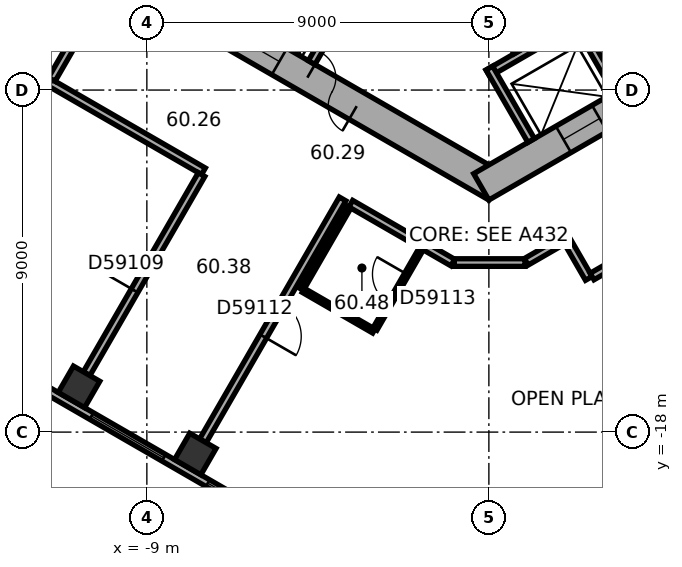
"""IFC4 building model, lengths in metres.
Left out: names, types, materials, properties, quantities, classifications, styles, units other than length and angle.
Written with IfcOpenShell. Run it as: python <this file> out.ifc"""

import sys

from ifc_helpers import new_model, si_unit, direction, frame, frame_2d, origin, origin_2d, place, context, subcontext, project, spatial, rectangle, extrude, element, fill, save


model = new_model("IFC4")
c1 = context("Model", 3, precision=1e-05, world=origin(), true_north=direction((0.0, 1.0)))
c2 = subcontext(c1, "Body", "Model", "MODEL_VIEW")
j1 = project(units=[si_unit("LENGTHUNIT", "METRE"), si_unit("PLANEANGLEUNIT", "RADIAN")], contexts=[c1])
p1 = place(None, origin())
s1 = spatial("IfcSite", under=j1, at=p1, CompositionType="ELEMENT")
p2 = place(p1, origin())
s2 = spatial("IfcBuilding", under=s1, at=p2, CompositionType="ELEMENT")
p3 = place(p2, frame((0.0, 0.0, 243.9)))
s3 = spatial("IfcBuildingStorey", under=s2, at=p3, CompositionType="ELEMENT", Elevation=243.9)
for number, where, z_axis, x_axis in (
    (1, (-10.785, -16.809, 0.0), (0.0, 0.0, 1.0), (0.866, -0.5, 0.0)),
    (2, (-7.725, -18.576, 0.0), (0.0, 0.0, 1.0), (0.866, -0.5, 0.0)),
):
    element("IfcColumn", number, at=place(p3, frame(where, z_axis=z_axis, x_axis=x_axis)), inside=s3, PredefinedType="COLUMN", context=c2, shape_type="SweptSolid", body=[
        extrude(rectangle(XDim=0.8, YDim=0.8, at=origin_2d()), origin(), (0.0, 0.0, 1.0), 3.7),
    ])
p4 = place(p3, frame((-10.1, -5.6, 0.0), z_axis=(0.0, 0.0, 1.0), x_axis=(0.866023897231, -0.500002609418, 0.0)))
e3 = element("IfcWall", 3, at=p4, inside=s3, PredefinedType="SHEAR", context=c2, shape_type="SweptSolid", body=[
    extrude(rectangle(XDim=11.894, YDim=0.8, at=frame_2d((5.947, 0.0))), origin(), (0.0, 0.0, 1.0), 3.7),
])
p5 = place(p4, frame((6.147, 0.0, 0.0)))
e4 = element("IfcOpeningElement", 4, at=p5, cuts=e3, PredefinedType="OPENING", context=c2, shape_type="SweptSolid", body=[
    extrude(rectangle(XDim=1.5, YDim=2.1, at=frame_2d((0.75, 1.05))), frame((0.0, 0.41, 0.0), z_axis=(0.0, -1.0, 0.0), x_axis=(1.0, 0.0, 0.0)), (0.0, 0.0, 1.0), 0.82),
])
p6 = place(p4, frame((1.597, 0.0, 0.0)))
e5 = element("IfcOpeningElement", 5, at=p6, cuts=e3, PredefinedType="OPENING", context=c2, shape_type="SweptSolid", body=[
    extrude(rectangle(XDim=1.1, YDim=2.1, at=frame_2d((0.55, 1.05))), frame((0.0, 0.41, 0.0), z_axis=(0.0, -1.0, 0.0), x_axis=(1.0, 0.0, 0.0)), (0.0, 0.0, 1.0), 0.82),
])
p7 = place(p4, frame((4.197, 0.0, 0.0)))
e6 = element("IfcOpeningElement", 6, at=p7, cuts=e3, PredefinedType="OPENING", context=c2, shape_type="SweptSolid", body=[
    extrude(rectangle(XDim=1.1, YDim=2.1, at=frame_2d((0.55, 1.05))), frame((0.0, 0.41, 0.0), z_axis=(0.0, -1.0, 0.0), x_axis=(1.0, 0.0, 0.0)), (0.0, 0.0, 1.0), 0.82),
])
p8 = place(p3, frame((-0.2, -11.547, 0.0), z_axis=(0.0, 0.0, 1.0), x_axis=(0.866023897231, 0.500002609418, 0.0)))
e7 = element("IfcWall", 7, at=p8, inside=s3, PredefinedType="SHEAR", context=c2, shape_type="SweptSolid", body=[
    extrude(rectangle(XDim=11.894, YDim=0.8, at=frame_2d((5.947, 0.0))), origin(), (0.0, 0.0, 1.0), 3.7),
])
p9 = place(p8, frame((2.497, 0.0, 0.0)))
e8 = element("IfcOpeningElement", 8, at=p9, cuts=e7, PredefinedType="OPENING", context=c2, shape_type="SweptSolid", body=[
    extrude(rectangle(XDim=1.1, YDim=2.1, at=frame_2d((0.55, 1.05))), frame((0.0, 0.41, 0.0), z_axis=(0.0, -1.0, 0.0), x_axis=(1.0, 0.0, 0.0)), (0.0, 0.0, 1.0), 0.82),
])
p10 = place(p8, frame((5.097, 0.0, 0.0)))
e9 = element("IfcOpeningElement", 9, at=p10, cuts=e7, PredefinedType="OPENING", context=c2, shape_type="SweptSolid", body=[
    extrude(rectangle(XDim=1.1, YDim=2.1, at=frame_2d((0.55, 1.05))), frame((0.0, 0.41, 0.0), z_axis=(0.0, -1.0, 0.0), x_axis=(1.0, 0.0, 0.0)), (0.0, 0.0, 1.0), 0.82),
])
p11 = place(p8, frame((7.697, 0.0, 0.0)))
e10 = element("IfcOpeningElement", 10, at=p11, cuts=e7, PredefinedType="OPENING", context=c2, shape_type="SweptSolid", body=[
    extrude(rectangle(XDim=1.1, YDim=2.1, at=frame_2d((0.55, 1.05))), frame((0.0, 0.41, 0.0), z_axis=(0.0, -1.0, 0.0), x_axis=(1.0, 0.0, 0.0)), (0.0, 0.0, 1.0), 0.82),
])
p12 = place(p3, frame((-17.664, -13.415, 0.0), z_axis=(0.0, 0.0, 1.0), x_axis=(0.866026555358, -0.49999800541, 0.0)))
e11 = element("IfcWall", 11, at=p12, inside=s3, PredefinedType="STANDARD", context=c2, shape_type="SweptSolid", body=[
    extrude(rectangle(XDim=18.841, YDim=0.2, at=frame_2d((9.421, 0.0))), origin(), (0.0, 0.0, 1.0), 3.7),
])
p13 = place(p12, frame((1.254, 0.0, 0.9)))
e12 = element("IfcOpeningElement", 12, at=p13, cuts=e11, PredefinedType="OPENING", context=c2, shape_type="SweptSolid", body=[
    extrude(rectangle(XDim=2.2, YDim=2.0, at=frame_2d((1.1, 1.0))), frame((0.0, 0.11, 0.0), z_axis=(0.0, -1.0, 0.0), x_axis=(1.0, 0.0, 0.0)), (0.0, 0.0, 1.0), 0.22),
])
p14 = place(p12, frame((4.788, 0.0, 0.9)))
e13 = element("IfcOpeningElement", 13, at=p14, cuts=e11, PredefinedType="OPENING", context=c2, shape_type="SweptSolid", body=[
    extrude(rectangle(XDim=2.2, YDim=2.0, at=frame_2d((1.1, 1.0))), frame((0.0, 0.11, 0.0), z_axis=(0.0, -1.0, 0.0), x_axis=(1.0, 0.0, 0.0)), (0.0, 0.0, 1.0), 0.22),
])
p15 = place(p12, frame((8.322, 0.0, 0.9)))
e14 = element("IfcOpeningElement", 14, at=p15, cuts=e11, PredefinedType="OPENING", context=c2, shape_type="SweptSolid", body=[
    extrude(rectangle(XDim=2.2, YDim=2.0, at=frame_2d((1.1, 1.0))), frame((0.0, 0.11, 0.0), z_axis=(0.0, -1.0, 0.0), x_axis=(1.0, 0.0, 0.0)), (0.0, 0.0, 1.0), 0.22),
])
p16 = place(p12, frame((11.855, 0.0, 0.9)))
e15 = element("IfcOpeningElement", 15, at=p16, cuts=e11, PredefinedType="OPENING", context=c2, shape_type="SweptSolid", body=[
    extrude(rectangle(XDim=2.2, YDim=2.0, at=frame_2d((1.1, 1.0))), frame((0.0, 0.11, 0.0), z_axis=(0.0, -1.0, 0.0), x_axis=(1.0, 0.0, 0.0)), (0.0, 0.0, 1.0), 0.22),
])
p17 = place(p12, frame((15.389, 0.0, 0.9)))
e16 = element("IfcOpeningElement", 16, at=p17, cuts=e11, PredefinedType="OPENING", context=c2, shape_type="SweptSolid", body=[
    extrude(rectangle(XDim=2.2, YDim=2.0, at=frame_2d((1.1, 1.0))), frame((0.0, 0.11, 0.0), z_axis=(0.0, -1.0, 0.0), x_axis=(1.0, 0.0, 0.0)), (0.0, 0.0, 1.0), 0.22),
])
p18 = place(p3, frame((2.739, -22.711, 0.0), z_axis=(0.0, 0.0, 1.0), x_axis=(0.833885723098, 0.551937134838, 0.0)))
e17 = element("IfcWall", 17, at=p18, inside=s3, PredefinedType="STANDARD", context=c2, shape_type="SweptSolid", body=[
    extrude(rectangle(XDim=18.841, YDim=0.2, at=frame_2d((9.421, 0.0))), origin(), (0.0, 0.0, 1.0), 3.7),
])
p19 = place(p18, frame((1.252, 0.0, 0.9)))
e18 = element("IfcOpeningElement", 18, at=p19, cuts=e17, PredefinedType="OPENING", context=c2, shape_type="SweptSolid", body=[
    extrude(rectangle(XDim=2.2, YDim=2.0, at=frame_2d((1.1, 1.0))), frame((0.0, 0.11, 0.0), z_axis=(0.0, -1.0, 0.0), x_axis=(1.0, 0.0, 0.0)), (0.0, 0.0, 1.0), 0.22),
])
p20 = place(p18, frame((4.786, 0.0, 0.9)))
e19 = element("IfcOpeningElement", 19, at=p20, cuts=e17, PredefinedType="OPENING", context=c2, shape_type="SweptSolid", body=[
    extrude(rectangle(XDim=2.2, YDim=2.0, at=frame_2d((1.1, 1.0))), frame((0.0, 0.11, 0.0), z_axis=(0.0, -1.0, 0.0), x_axis=(1.0, 0.0, 0.0)), (0.0, 0.0, 1.0), 0.22),
])
p21 = place(p18, frame((8.32, 0.0, 0.9)))
e20 = element("IfcOpeningElement", 20, at=p21, cuts=e17, PredefinedType="OPENING", context=c2, shape_type="SweptSolid", body=[
    extrude(rectangle(XDim=2.2, YDim=2.0, at=frame_2d((1.1, 1.0))), frame((0.0, 0.11, 0.0), z_axis=(0.0, -1.0, 0.0), x_axis=(1.0, 0.0, 0.0)), (0.0, 0.0, 1.0), 0.22),
])
p22 = place(p18, frame((11.854, 0.0, 0.9)))
e21 = element("IfcOpeningElement", 21, at=p22, cuts=e17, PredefinedType="OPENING", context=c2, shape_type="SweptSolid", body=[
    extrude(rectangle(XDim=2.2, YDim=2.0, at=frame_2d((1.1, 1.0))), frame((0.0, 0.11, 0.0), z_axis=(0.0, -1.0, 0.0), x_axis=(1.0, 0.0, 0.0)), (0.0, 0.0, 1.0), 0.22),
])
p23 = place(p18, frame((15.387, 0.0, 0.9)))
e22 = element("IfcOpeningElement", 22, at=p23, cuts=e17, PredefinedType="OPENING", context=c2, shape_type="SweptSolid", body=[
    extrude(rectangle(XDim=2.2, YDim=2.0, at=frame_2d((1.1, 1.0))), frame((0.0, 0.11, 0.0), z_axis=(0.0, -1.0, 0.0), x_axis=(1.0, 0.0, 0.0)), (0.0, 0.0, 1.0), 0.22),
])
p24 = place(p3, frame((-3.563, -6.372, 0.0), z_axis=(0.0, 0.0, 1.0), x_axis=(-0.499994660107, -0.866028486751, 0.0)))
e23 = element("IfcWall", 23, at=p24, inside=s3, PredefinedType="PARTITIONING", context=c2, shape_type="SweptSolid", body=[
    extrude(rectangle(XDim=2.2, YDim=0.2, at=frame_2d((1.1, 0.0))), origin(), (0.0, 0.0, 1.0), 3.42),
])
p25 = place(p3, frame((-0.024, -8.559, 0.0), z_axis=(0.0, 0.0, 1.0), x_axis=(0.866026010844, 0.49999894854, 0.0)))
e24 = element("IfcWall", 24, at=p25, inside=s3, PredefinedType="PARTITIONING", context=c2, shape_type="SweptSolid", body=[
    extrude(rectangle(XDim=8.0, YDim=0.2, at=frame_2d((4.0, 0.0))), origin(), (0.0, 0.0, 1.0), 3.42),
])
for number, where, z_axis, x_axis in (
    (25, (0.013, -8.422, 0.0), (0.0, 0.0, 1.0), (0.5, -0.866, 0.0)),
    (26, (2.264, -7.122, 0.0), (0.0, 0.0, 1.0), (0.5, -0.866, 0.0)),
):
    element("IfcWall", number, at=place(p3, frame(where, z_axis=z_axis, x_axis=x_axis)), inside=s3, PredefinedType="PARTITIONING", context=c2, shape_type="SweptSolid", body=[
        extrude(rectangle(XDim=2.2, YDim=0.2, at=frame_2d((1.1, 0.0))), origin(), (0.0, 0.0, 1.0), 3.42),
    ])
p26 = place(p3, frame((-1.558, -3.902, 0.0), z_axis=(0.0, 0.0, 1.0), x_axis=(0.499977259774, -0.866038532462, 0.0)))
e27 = element("IfcWall", 27, at=p26, inside=s3, PredefinedType="SHEAR", context=c2, shape_type="SweptSolid", body=[
    extrude(rectangle(XDim=4.7, YDim=0.3, at=frame_2d((2.35, 0.0))), origin(), (0.0, 0.0, 1.0), 3.42),
])
p27 = place(p26, frame((0.8, 0.0, 0.0)))
e28 = element("IfcOpeningElement", 28, at=p27, cuts=e27, PredefinedType="OPENING", context=c2, shape_type="SweptSolid", body=[
    extrude(rectangle(XDim=1.2, YDim=2.1, at=frame_2d((0.6, 1.05))), frame((0.0, 0.16, 0.0), z_axis=(0.0, -1.0, 0.0), x_axis=(1.0, 0.0, 0.0)), (0.0, 0.0, 1.0), 0.32),
])
p28 = place(p3, frame((-11.551, -8.805, 0.0), z_axis=(0.0, 0.0, 1.0), x_axis=(0.866038310922, -0.499977643516, 0.0)))
e29 = element("IfcWall", 29, at=p28, inside=s3, PredefinedType="PARTITIONING", context=c2, shape_type="SweptSolid", body=[
    extrude(rectangle(XDim=4.665, YDim=0.2, at=frame_2d((2.333, 0.0))), origin(), (0.0, 0.0, 1.0), 3.42),
])
p29 = place(p3, frame((-10.951, -7.765, 0.0), z_axis=(0.0, 0.0, 1.0), x_axis=(-0.499978356969, -0.866037899034, 0.0)))
e30 = element("IfcWall", 30, at=p29, inside=s3, PredefinedType="PARTITIONING", context=c2, shape_type="SweptSolid", body=[
    extrude(rectangle(XDim=1.101, YDim=0.2, at=frame_2d((0.551, 0.0))), origin(), (0.0, 0.0, 1.0), 3.42),
])
p30 = place(p3, frame((-10.585, -16.463, 0.0), z_axis=(0.0, 0.0, 1.0), x_axis=(0.499993802756, 0.866028981735, 0.0)))
e31 = element("IfcWall", 31, at=p30, inside=s3, PredefinedType="PARTITIONING", context=c2, shape_type="SweptSolid", body=[
    extrude(rectangle(XDim=6.049, YDim=0.2, at=frame_2d((3.024, 0.0))), origin(), (0.0, 0.0, 1.0), 2.87),
])
p31 = place(p30, frame((2.524, 0.0, 0.0)))
e32 = element("IfcOpeningElement", 32, at=p31, cuts=e31, PredefinedType="OPENING", context=c2, shape_type="SweptSolid", body=[
    extrude(rectangle(XDim=1.0, YDim=2.1, at=frame_2d((0.5, 1.05))), frame((0.0, 0.11, 0.0), z_axis=(0.0, -1.0, 0.0), x_axis=(1.0, 0.0, 0.0)), (0.0, 0.0, 1.0), 0.22),
])
p32 = place(p3, frame((-7.525, -18.23, 0.0), z_axis=(0.0, 0.0, 1.0), x_axis=(0.499983153418, 0.866035129944, 0.0)))
e33 = element("IfcWall", 33, at=p32, inside=s3, PredefinedType="PARTITIONING", context=c2, shape_type="SweptSolid", body=[
    extrude(rectangle(XDim=7.35, YDim=0.2, at=frame_2d((3.675, 0.0))), origin(), (0.0, 0.0, 1.0), 3.42),
])
p33 = place(p32, frame((3.175, 0.0, 0.0)))
e34 = element("IfcOpeningElement", 34, at=p33, cuts=e33, PredefinedType="OPENING", context=c2, shape_type="SweptSolid", body=[
    extrude(rectangle(XDim=1.0, YDim=2.1, at=frame_2d((0.5, 1.05))), frame((0.0, 0.11, 0.0), z_axis=(0.0, -1.0, 0.0), x_axis=(1.0, 0.0, 0.0)), (0.0, 0.0, 1.0), 0.22),
])
p34 = place(p3, frame((-4.934, -14.241, 0.0), z_axis=(0.0, 0.0, 1.0), x_axis=(0.500004234368, 0.866022959057, 0.0)))
e35 = element("IfcWall", 35, at=p34, inside=s3, PredefinedType="PARTITIONING", context=c2, shape_type="SweptSolid", body=[
    extrude(rectangle(XDim=2.5, YDim=0.12, at=frame_2d((1.25, 0.0))), origin(), (0.0, 0.0, 1.0), 3.42),
])
p35 = place(p3, frame((-3.634, -11.99, 0.0), z_axis=(0.0, 0.0, 1.0), x_axis=(0.866033392248, -0.499986163319, 0.0)))
e36 = element("IfcWall", 36, at=p35, inside=s3, PredefinedType="PARTITIONING", context=c2, shape_type="SweptSolid", body=[
    extrude(rectangle(XDim=3.099, YDim=0.2, at=frame_2d((1.549, 0.0))), origin(), (0.0, 0.0, 1.0), 3.42),
])
p36 = place(p3, frame((-3.028, -15.341, 0.0), z_axis=(0.0, 0.0, 1.0), x_axis=(-0.86600889856, 0.500028586798, 0.0)))
e37 = element("IfcWall", 37, at=p36, inside=s3, PredefinedType="PARTITIONING", context=c2, shape_type="SweptSolid", body=[
    extrude(rectangle(XDim=2.14, YDim=0.12, at=frame_2d((1.07, 0.0))), origin(), (0.0, 0.0, 1.0), 3.42),
])
p37 = place(p3, frame((-1.778, -13.176, 0.0), z_axis=(0.0, 0.0, 1.0), x_axis=(-0.500002508028, -0.866023955769, 0.0)))
e38 = element("IfcWall", 38, at=p37, inside=s3, PredefinedType="PARTITIONING", context=c2, shape_type="SweptSolid", body=[
    extrude(rectangle(XDim=2.44, YDim=0.12, at=frame_2d((1.22, 0.0))), origin(), (0.0, 0.0, 1.0), 3.42),
])
p38 = place(p37, frame((0.77, 0.0, 0.0)))
e39 = element("IfcOpeningElement", 39, at=p38, cuts=e38, PredefinedType="OPENING", context=c2, shape_type="SweptSolid", body=[
    extrude(rectangle(XDim=0.9, YDim=2.1, at=frame_2d((0.45, 1.05))), frame((0.0, 0.07, 0.0), z_axis=(0.0, -1.0, 0.0), x_axis=(1.0, 0.0, 0.0)), (0.0, 0.0, 1.0), 0.14),
])
p39 = place(p3, frame((-0.91, -13.539, 0.0), z_axis=(0.0, 0.0, 1.0), x_axis=(1.0, 0.0, 0.0)))
e40 = element("IfcWall", 40, at=p39, inside=s3, PredefinedType="PARTITIONING", context=c2, shape_type="SweptSolid", body=[
    extrude(rectangle(XDim=1.86, YDim=0.2, at=frame_2d((0.93, 0.0))), origin(), (0.0, 0.0, 1.0), 3.42),
])
p40 = place(p3, frame((0.985, -13.519, 0.0), z_axis=(0.0, 0.0, 1.0), x_axis=(0.866054082991, 0.499950322867, 0.0)))
e41 = element("IfcWall", 41, at=p40, inside=s3, PredefinedType="PARTITIONING", context=c2, shape_type="SweptSolid", body=[
    extrude(rectangle(XDim=1.206, YDim=0.2, at=frame_2d((0.603, 0.0))), origin(), (0.0, 0.0, 1.0), 3.42),
])
p41 = place(p3, frame((2.079, -13.003, 0.0), z_axis=(0.0, 0.0, 1.0), x_axis=(0.500074377092, -0.865982457891, 0.0)))
e42 = element("IfcWall", 42, at=p41, inside=s3, PredefinedType="PARTITIONING", context=c2, shape_type="SweptSolid", body=[
    extrude(rectangle(XDim=1.101, YDim=0.2, at=frame_2d((0.55, 0.0))), origin(), (0.0, 0.0, 1.0), 3.42),
])
p42 = place(p3, frame((2.716, -13.906, 0.0), z_axis=(0.0, 0.0, 1.0), x_axis=(0.866040290674, 0.499974214264, 0.0)))
e43 = element("IfcWall", 43, at=p42, inside=s3, PredefinedType="PARTITIONING", context=c2, shape_type="SweptSolid", body=[
    extrude(rectangle(XDim=8.702, YDim=0.2, at=frame_2d((4.351, 0.0))), origin(), (0.0, 0.0, 1.0), 3.42),
])
p43 = place(p42, frame((5.26, 0.0, 0.0)))
e44 = element("IfcOpeningElement", 44, at=p43, cuts=e43, PredefinedType="OPENING", context=c2, shape_type="SweptSolid", body=[
    extrude(rectangle(XDim=1.0, YDim=2.1, at=frame_2d((0.5, 1.05))), frame((0.0, 0.11, 0.0), z_axis=(0.0, -1.0, 0.0), x_axis=(1.0, 0.0, 0.0)), (0.0, 0.0, 1.0), 0.22),
])
p44 = place(p15, origin())
e45 = element("IfcWindow", 45, at=p44, inside=s3, PartitioningType="SINGLE_PANEL", PredefinedType="WINDOW", context=c2, shape_type="SweptSolid", body=[
    extrude(rectangle(XDim=2.2, YDim=2.0, at=frame_2d((1.1, 1.0))), frame((0.0, 0.03, 0.0), z_axis=(0.0, -1.0, 0.0), x_axis=(1.0, 0.0, 0.0)), (0.0, 0.0, 1.0), 0.06),
])
fill(e14, e45)
p45 = place(p16, origin())
e46 = element("IfcWindow", 46, at=p45, inside=s3, PartitioningType="SINGLE_PANEL", PredefinedType="WINDOW", context=c2, shape_type="SweptSolid", body=[
    extrude(rectangle(XDim=2.2, YDim=2.0, at=frame_2d((1.1, 1.0))), frame((0.0, 0.03, 0.0), z_axis=(0.0, -1.0, 0.0), x_axis=(1.0, 0.0, 0.0)), (0.0, 0.0, 1.0), 0.06),
])
fill(e15, e46)
p46 = place(p5, origin())
e47 = element("IfcDoor", 47, at=p46, inside=s3, OperationType="DOUBLE_DOOR_SINGLE_SWING", PredefinedType="DOOR", context=c2, shape_type="SweptSolid", body=[
    extrude(rectangle(XDim=1.5, YDim=2.1, at=frame_2d((0.75, 1.05))), frame((0.0, 0.025, 0.0), z_axis=(0.0, -1.0, 0.0), x_axis=(1.0, 0.0, 0.0)), (0.0, 0.0, 1.0), 0.05),
])
fill(e4, e47)
p47 = place(p7, origin())
e48 = element("IfcDoor", 48, at=p47, inside=s3, OperationType="DOUBLE_DOOR_SLIDING", PredefinedType="DOOR", context=c2, shape_type="SweptSolid", body=[
    extrude(rectangle(XDim=1.1, YDim=2.1, at=frame_2d((0.55, 1.05))), frame((0.0, 0.025, 0.0), z_axis=(0.0, -1.0, 0.0), x_axis=(1.0, 0.0, 0.0)), (0.0, 0.0, 1.0), 0.05),
])
fill(e6, e48)
p48 = place(p9, origin())
e49 = element("IfcDoor", 49, at=p48, inside=s3, OperationType="DOUBLE_DOOR_SLIDING", PredefinedType="DOOR", context=c2, shape_type="SweptSolid", body=[
    extrude(rectangle(XDim=1.1, YDim=2.1, at=frame_2d((0.55, 1.05))), frame((0.0, 0.025, 0.0), z_axis=(0.0, -1.0, 0.0), x_axis=(1.0, 0.0, 0.0)), (0.0, 0.0, 1.0), 0.05),
])
fill(e8, e49)
p49 = place(p31, origin())
e50 = element("IfcDoor", 50, at=p49, inside=s3, OperationType="SINGLE_SWING_LEFT", PredefinedType="DOOR", context=c2, shape_type="SweptSolid", body=[
    extrude(rectangle(XDim=1.0, YDim=2.1, at=frame_2d((0.5, 1.05))), frame((0.0, 0.025, 0.0), z_axis=(0.0, -1.0, 0.0), x_axis=(1.0, 0.0, 0.0)), (0.0, 0.0, 1.0), 0.05),
])
fill(e32, e50)
p50 = place(p33, origin())
e51 = element("IfcDoor", 51, at=p50, inside=s3, OperationType="SINGLE_SWING_LEFT", PredefinedType="DOOR", context=c2, shape_type="SweptSolid", body=[
    extrude(rectangle(XDim=1.0, YDim=2.1, at=frame_2d((0.5, 1.05))), frame((0.0, 0.025, 0.0), z_axis=(0.0, -1.0, 0.0), x_axis=(1.0, 0.0, 0.0)), (0.0, 0.0, 1.0), 0.05),
])
fill(e34, e51)
p51 = place(p38, origin())
e52 = element("IfcDoor", 52, at=p51, inside=s3, OperationType="SINGLE_SWING_LEFT", PredefinedType="DOOR", context=c2, shape_type="SweptSolid", body=[
    extrude(rectangle(XDim=0.9, YDim=2.1, at=frame_2d((0.45, 1.05))), frame((0.0, 0.025, 0.0), z_axis=(0.0, -1.0, 0.0), x_axis=(1.0, 0.0, 0.0)), (0.0, 0.0, 1.0), 0.05),
])
fill(e39, e52)
save(model, sys.argv[1])
